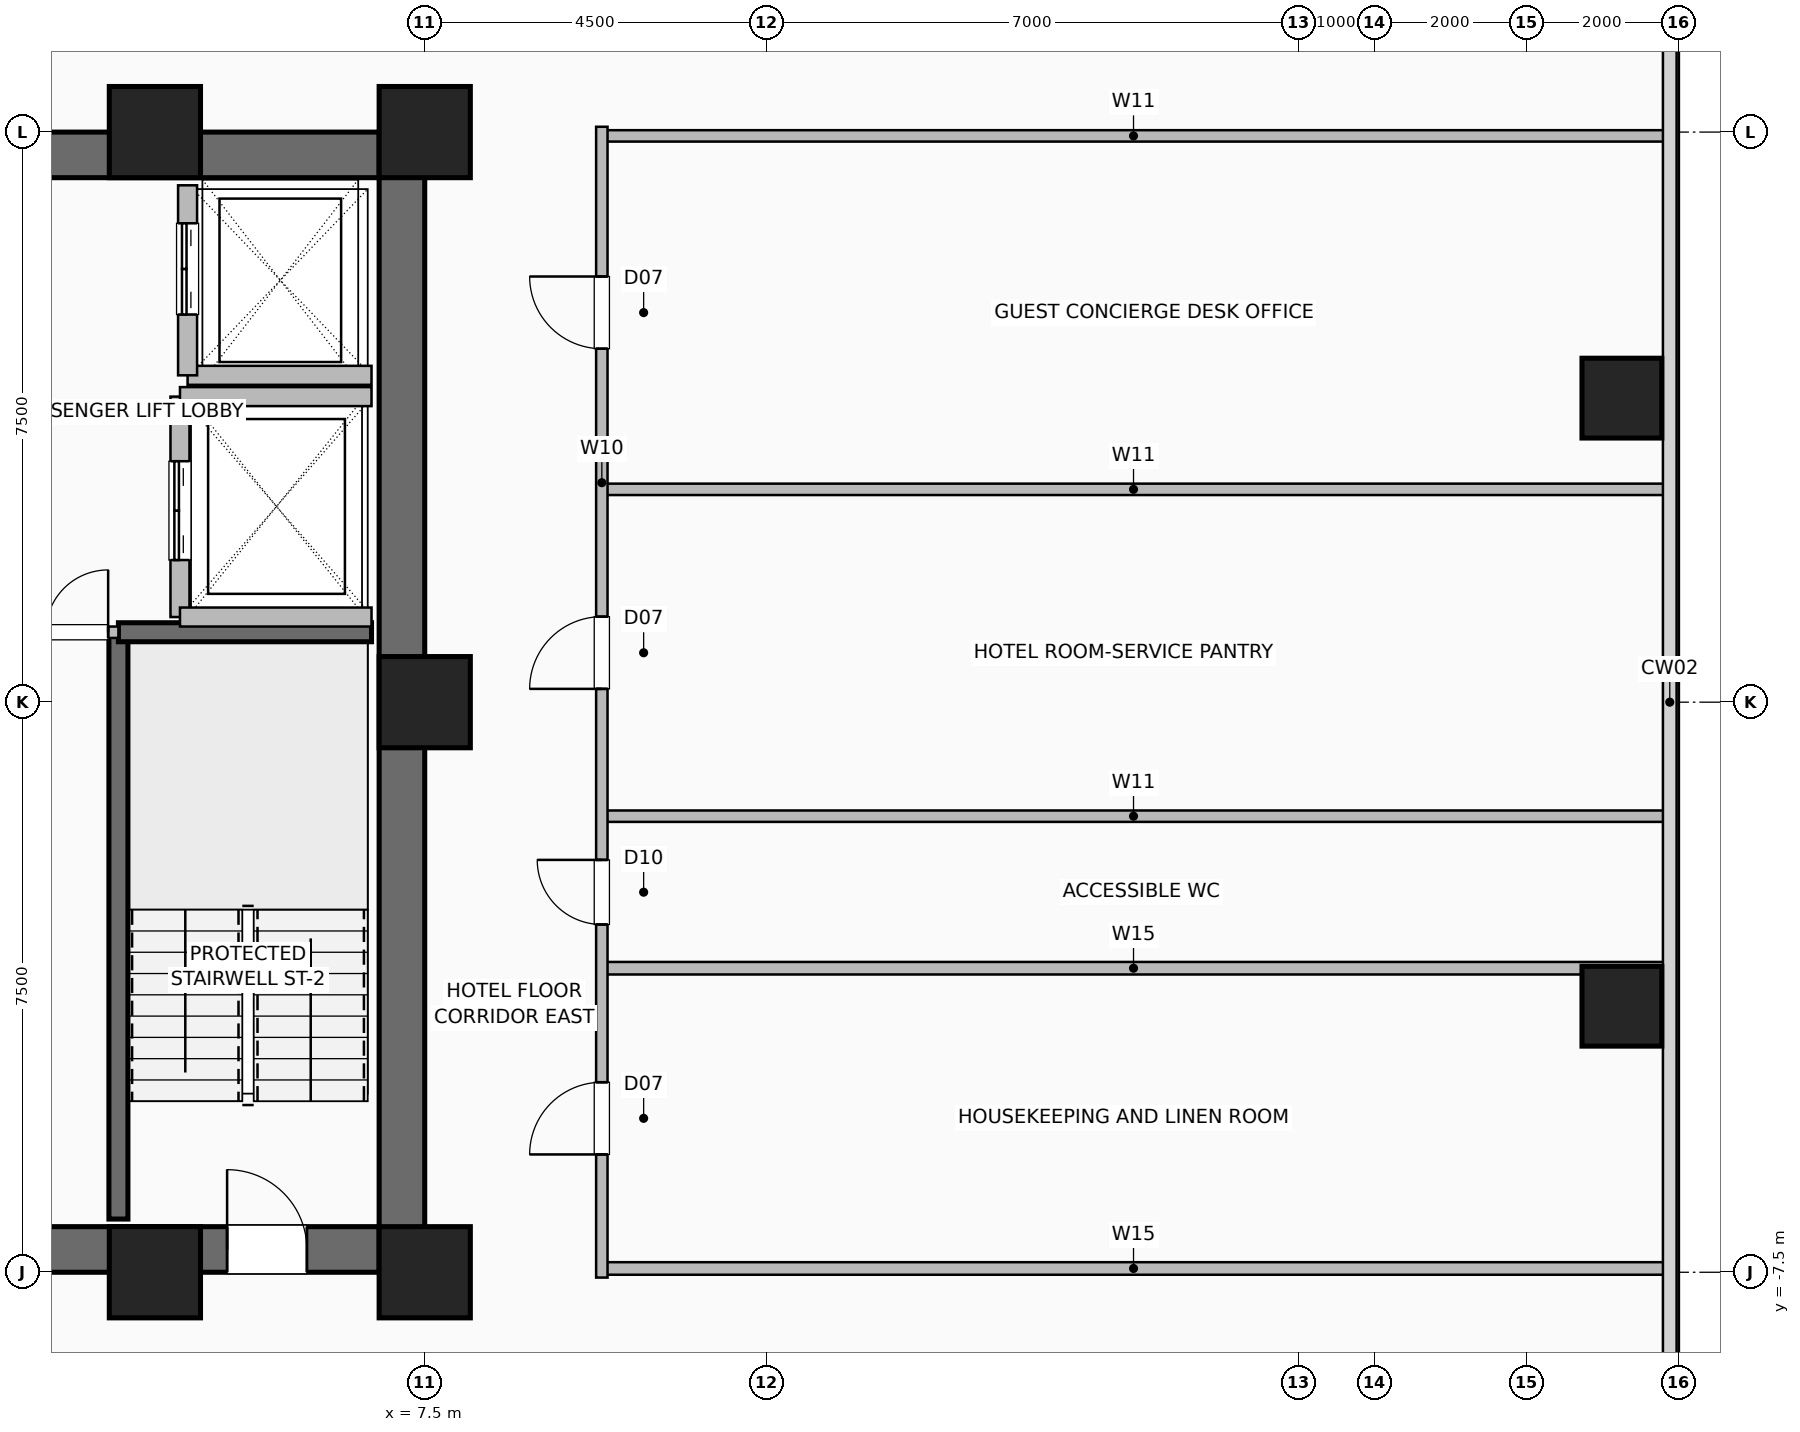
"""IFC4 building model, lengths in metres.
Left out: names, types, materials, properties, quantities, classifications, styles, units other than length and angle.
Written with IfcOpenShell. Run it as: python <this file> out.ifc"""

import sys

from ifc_helpers import new_model, si_unit, direction, frame, frame_2d, origin, origin_2d, place, context, subcontext, project, spatial, rectangle, hollow_rectangle, extrude, element, fill, save


model = new_model("IFC4")
c1 = context("Model", 3, precision=1e-05, world=origin(), true_north=direction((0.0, 1.0)))
c2 = subcontext(c1, "Body", "Model", "MODEL_VIEW")
j1 = project(units=[si_unit("LENGTHUNIT", "METRE"), si_unit("PLANEANGLEUNIT", "RADIAN")], contexts=[c1])
p1 = place(None, origin())
s1 = spatial("IfcSite", under=j1, at=p1, CompositionType="ELEMENT")
p2 = place(p1, origin())
s2 = spatial("IfcBuilding", under=s1, at=p2, CompositionType="ELEMENT")
p3 = place(p2, frame((0.0, 0.0, 30.5)))
s3 = spatial("IfcBuildingStorey", under=s2, at=p3, CompositionType="ELEMENT", Elevation=30.5)
for number, where, z_axis, x_axis in (
    (1, (3.95, -7.5, 0.0), (0.0, 0.0, 1.0), (1.0, 0.0, 0.0)),
    (2, (7.5, -7.5, 0.0), (0.0, 0.0, 1.0), (1.0, 0.0, 0.0)),
    (3, (7.5, 0.0, 0.0), (0.0, 0.0, 1.0), (1.0, 0.0, 0.0)),
    (4, (7.5, 7.5, 0.0), (0.0, 0.0, 1.0), (1.0, 0.0, 0.0)),
    (5, (3.95, 7.5, 0.0), (0.0, 0.0, 1.0), (1.0, 0.0, 0.0)),
):
    element("IfcColumn", number, at=place(p3, frame(where, z_axis=z_axis, x_axis=x_axis)), inside=s3, PredefinedType="COLUMN", context=c2, shape_type="SweptSolid", body=[
        extrude(hollow_rectangle(XDim=1.2, YDim=1.2, WallThickness=0.055, at=origin_2d()), origin(), (0.0, 0.0, 1.0), 3.5),
    ])
for number, where, z_axis, x_axis in (
    (6, (23.25, -4.0, 0.0), (0.0, 0.0, 1.0), (1.0, 0.0, 0.0)),
    (7, (23.25, 4.0, 0.0), (0.0, 0.0, 1.0), (1.0, 0.0, 0.0)),
):
    element("IfcColumn", number, at=place(p3, frame(where, z_axis=z_axis, x_axis=x_axis)), inside=s3, PredefinedType="COLUMN", context=c2, shape_type="SweptSolid", body=[
        extrude(hollow_rectangle(XDim=1.05, YDim=1.05, WallThickness=0.05, at=origin_2d()), origin(), (0.0, 0.0, 1.0), 3.5),
    ])
p4 = place(p3, frame((-7.5, -7.2, 0.0), z_axis=(0.0, 0.0, 1.0), x_axis=(1.0, 0.0, 0.0)))
e8 = element("IfcWall", 8, at=p4, inside=s3, PredefinedType="SHEAR", context=c2, shape_type="SweptSolid", body=[
    extrude(rectangle(XDim=15.0, YDim=0.6, at=frame_2d((7.5, 0.0))), origin(), (0.0, 0.0, 1.0), 3.25),
])
p5 = place(p4, frame((1.55, 0.0, 0.0)))
e9 = element("IfcOpeningElement", 9, at=p5, cuts=e8, PredefinedType="OPENING", context=c2, shape_type="SweptSolid", body=[
    extrude(rectangle(XDim=1.05, YDim=2.08, at=frame_2d((0.525, 1.04))), frame((0.0, 0.31, 0.0), z_axis=(0.0, -1.0, 0.0), x_axis=(1.0, 0.0, 0.0)), (0.0, 0.0, 1.0), 0.62),
])
p6 = place(p4, frame((12.4, 0.0, 0.0)))
e10 = element("IfcOpeningElement", 10, at=p6, cuts=e8, PredefinedType="OPENING", context=c2, shape_type="SweptSolid", body=[
    extrude(rectangle(XDim=1.05, YDim=2.08, at=frame_2d((0.525, 1.04))), frame((0.0, 0.31, 0.0), z_axis=(0.0, -1.0, 0.0), x_axis=(1.0, 0.0, 0.0)), (0.0, 0.0, 1.0), 0.62),
])
p7 = place(p4, frame((4.64, 0.0, 0.0)))
e11 = element("IfcOpeningElement", 11, at=p7, cuts=e8, PredefinedType="OPENING", context=c2, shape_type="SweptSolid", body=[
    extrude(rectangle(XDim=1.1, YDim=2.2, at=frame_2d((0.55, 1.1))), frame((0.0, 0.31, 0.0), z_axis=(0.0, -1.0, 0.0), x_axis=(1.0, 0.0, 0.0)), (0.0, 0.0, 1.0), 0.62),
])
p8 = place(p4, frame((6.52, 0.0, 0.0)))
e12 = element("IfcOpeningElement", 12, at=p8, cuts=e8, PredefinedType="OPENING", context=c2, shape_type="SweptSolid", body=[
    extrude(rectangle(XDim=1.1, YDim=2.2, at=frame_2d((0.55, 1.1))), frame((0.0, 0.31, 0.0), z_axis=(0.0, -1.0, 0.0), x_axis=(1.0, 0.0, 0.0)), (0.0, 0.0, 1.0), 0.62),
])
p9 = place(p4, frame((8.4, 0.0, 0.0)))
e13 = element("IfcOpeningElement", 13, at=p9, cuts=e8, PredefinedType="OPENING", context=c2, shape_type="SweptSolid", body=[
    extrude(rectangle(XDim=1.1, YDim=2.2, at=frame_2d((0.55, 1.1))), frame((0.0, 0.31, 0.0), z_axis=(0.0, -1.0, 0.0), x_axis=(1.0, 0.0, 0.0)), (0.0, 0.0, 1.0), 0.62),
])
for number, where, z_axis, x_axis in (
    (14, (-7.5, 7.2, 0.0), (0.0, 0.0, 1.0), (1.0, 0.0, 0.0)),
    (15, (7.2, -7.5, 0.0), (0.0, 0.0, 1.0), (0.0, 1.0, 0.0)),
):
    element("IfcWall", number, at=place(p3, frame(where, z_axis=z_axis, x_axis=x_axis)), inside=s3, PredefinedType="SHEAR", context=c2, shape_type="SweptSolid", body=[
        extrude(rectangle(XDim=15.0, YDim=0.6, at=frame_2d((7.5, 0.0))), origin(), (0.0, 0.0, 1.0), 3.25),
    ])
p10 = place(p3, frame((3.47, -6.8, 0.0), z_axis=(0.0, 0.0, 1.0), x_axis=(0.0, 1.0, 0.0)))
e16 = element("IfcWall", 16, at=p10, inside=s3, PredefinedType="SHEAR", context=c2, shape_type="SweptSolid", body=[
    extrude(rectangle(XDim=7.72, YDim=0.25, at=frame_2d((3.86, 0.0))), origin(), (0.0, 0.0, 1.0), 3.25),
])
p11 = place(p3, frame((3.47, 0.92, 0.0), z_axis=(0.0, 0.0, 1.0), x_axis=(1.0, 0.0, 0.0)))
e17 = element("IfcWall", 17, at=p11, inside=s3, PredefinedType="SHEAR", context=c2, shape_type="SweptSolid", body=[
    extrude(rectangle(XDim=3.33, YDim=0.25, at=frame_2d((1.665, 0.0))), origin(), (0.0, 0.0, 1.0), 3.25),
])
p12 = place(p3, frame((4.38, 4.3, 0.0), z_axis=(0.0, 0.0, 1.0), x_axis=(1.0, 0.0, 0.0)))
e18 = element("IfcWall", 18, at=p12, inside=s3, PredefinedType="SHEAR", context=c2, shape_type="SweptSolid", body=[
    extrude(rectangle(XDim=2.42, YDim=0.25, at=frame_2d((1.21, 0.0))), origin(), (0.0, 0.0, 1.0), 3.25),
])
p13 = place(p3, frame((4.38, 4.3, 0.0), z_axis=(0.0, 0.0, 1.0), x_axis=(0.0, 1.0, 0.0)))
e19 = element("IfcWall", 19, at=p13, inside=s3, PredefinedType="SHEAR", context=c2, shape_type="SweptSolid", body=[
    extrude(rectangle(XDim=2.5, YDim=0.25, at=frame_2d((1.25, 0.0))), origin(), (0.0, 0.0, 1.0), 3.25),
])
p14 = place(p13, frame((0.8, 0.0, 0.0)))
e20 = element("IfcOpeningElement", 20, at=p14, cuts=e19, PredefinedType="OPENING", context=c2, shape_type="SweptSolid", body=[
    extrude(rectangle(XDim=1.2, YDim=2.2, at=frame_2d((0.6, 1.1))), frame((0.0, 0.135, 0.0), z_axis=(0.0, -1.0, 0.0), x_axis=(1.0, 0.0, 0.0)), (0.0, 0.0, 1.0), 0.27),
])
p15 = place(p3, frame((4.28, 1.12, 0.0), z_axis=(0.0, 0.0, 1.0), x_axis=(0.0, 1.0, 0.0)))
e21 = element("IfcWall", 21, at=p15, inside=s3, PredefinedType="SHEAR", context=c2, shape_type="SweptSolid", body=[
    extrude(rectangle(XDim=2.9, YDim=0.25, at=frame_2d((1.45, 0.0))), origin(), (0.0, 0.0, 1.0), 3.25),
])
p16 = place(p15, frame((0.75, 0.0, 0.0)))
e22 = element("IfcOpeningElement", 22, at=p16, cuts=e21, PredefinedType="OPENING", context=c2, shape_type="SweptSolid", body=[
    extrude(rectangle(XDim=1.3, YDim=2.3, at=frame_2d((0.65, 1.15))), frame((0.0, 0.135, 0.0), z_axis=(0.0, -1.0, 0.0), x_axis=(1.0, 0.0, 0.0)), (0.0, 0.0, 1.0), 0.27),
])
for number, where, z_axis, x_axis in (
    (23, (4.28, 1.12, 0.0), (0.0, 0.0, 1.0), (1.0, 0.0, 0.0)),
    (24, (4.28, 4.02, 0.0), (0.0, 0.0, 1.0), (1.0, 0.0, 0.0)),
):
    element("IfcWall", number, at=place(p3, frame(where, z_axis=z_axis, x_axis=x_axis)), inside=s3, PredefinedType="SHEAR", context=c2, shape_type="SweptSolid", body=[
        extrude(rectangle(XDim=2.52, YDim=0.25, at=frame_2d((1.26, 0.0))), origin(), (0.0, 0.0, 1.0), 3.25),
    ])
p17 = place(p3, frame((2.38, 0.92, 0.0), z_axis=(0.0, 0.0, 1.0), x_axis=(1.0, 0.0, 0.0)))
e25 = element("IfcWall", 25, at=p17, inside=s3, PredefinedType="PARTITIONING", context=c2, shape_type="SweptSolid", body=[
    extrude(rectangle(XDim=1.09, YDim=0.15, at=frame_2d((0.545, 0.0))), origin(), (0.0, 0.0, 1.0), 3.25),
])
p18 = place(p17, frame((0.135, 0.0, 0.0)))
e26 = element("IfcOpeningElement", 26, at=p18, cuts=e25, PredefinedType="OPENING", context=c2, shape_type="SweptSolid", body=[
    extrude(rectangle(XDim=0.82, YDim=2.05, at=frame_2d((0.41, 1.025))), frame((0.0, 0.085, 0.0), z_axis=(0.0, -1.0, 0.0), x_axis=(1.0, 0.0, 0.0)), (0.0, 0.0, 1.0), 0.17),
])
for number, where, z_axis, x_axis in (
    (27, (9.83, -7.45, 0.0), (0.0, 0.0, 1.0), (1.0, 0.0, 0.0)),
    (28, (9.83, -3.5, 0.0), (0.0, 0.0, 1.0), (1.0, 0.0, 0.0)),
):
    element("IfcWall", number, at=place(p3, frame(where, z_axis=z_axis, x_axis=x_axis)), inside=s3, PredefinedType="PLUMBINGWALL", context=c2, shape_type="SweptSolid", body=[
        extrude(rectangle(XDim=13.99, YDim=0.165, at=frame_2d((6.995, 0.0))), origin(), (0.0, 0.0, 1.0), 3.25),
    ])
for number, where, z_axis, x_axis in (
    (29, (9.83, -1.5, 0.0), (0.0, 0.0, 1.0), (1.0, 0.0, 0.0)),
    (30, (9.83, 2.8, 0.0), (0.0, 0.0, 1.0), (1.0, 0.0, 0.0)),
    (31, (9.83, 7.45, 0.0), (0.0, 0.0, 1.0), (1.0, 0.0, 0.0)),
):
    element("IfcWall", number, at=place(p3, frame(where, z_axis=z_axis, x_axis=x_axis)), inside=s3, PredefinedType="PARTITIONING", context=c2, shape_type="SweptSolid", body=[
        extrude(rectangle(XDim=13.99, YDim=0.15, at=frame_2d((6.995, 0.0))), origin(), (0.0, 0.0, 1.0), 3.25),
    ])
p19 = place(p3, frame((9.83, -7.57, 0.0), z_axis=(0.0, 0.0, 1.0), x_axis=(0.0, 1.0, 0.0)))
e32 = element("IfcWall", 32, at=p19, inside=s3, PredefinedType="PARTITIONING", context=c2, shape_type="SweptSolid", body=[
    extrude(rectangle(XDim=15.14, YDim=0.15, at=frame_2d((7.57, 0.0))), origin(), (0.0, 0.0, 1.0), 3.25),
])
p20 = place(p19, frame((1.62, 0.0, 0.0)))
e33 = element("IfcOpeningElement", 33, at=p20, cuts=e32, PredefinedType="OPENING", context=c2, shape_type="SweptSolid", body=[
    extrude(rectangle(XDim=0.95, YDim=2.06, at=frame_2d((0.475, 1.03))), frame((0.0, 0.085, 0.0), z_axis=(0.0, -1.0, 0.0), x_axis=(1.0, 0.0, 0.0)), (0.0, 0.0, 1.0), 0.17),
])
p21 = place(p19, frame((4.645, 0.0, 0.0)))
e34 = element("IfcOpeningElement", 34, at=p21, cuts=e32, PredefinedType="OPENING", context=c2, shape_type="SweptSolid", body=[
    extrude(rectangle(XDim=0.85, YDim=2.05, at=frame_2d((0.425, 1.025))), frame((0.0, 0.085, 0.0), z_axis=(0.0, -1.0, 0.0), x_axis=(1.0, 0.0, 0.0)), (0.0, 0.0, 1.0), 0.17),
])
p22 = place(p19, frame((7.745, 0.0, 0.0)))
e35 = element("IfcOpeningElement", 35, at=p22, cuts=e32, PredefinedType="OPENING", context=c2, shape_type="SweptSolid", body=[
    extrude(rectangle(XDim=0.95, YDim=2.06, at=frame_2d((0.475, 1.03))), frame((0.0, 0.085, 0.0), z_axis=(0.0, -1.0, 0.0), x_axis=(1.0, 0.0, 0.0)), (0.0, 0.0, 1.0), 0.17),
])
p23 = place(p19, frame((12.22, 0.0, 0.0)))
e36 = element("IfcOpeningElement", 36, at=p23, cuts=e32, PredefinedType="OPENING", context=c2, shape_type="SweptSolid", body=[
    extrude(rectangle(XDim=0.95, YDim=2.06, at=frame_2d((0.475, 1.03))), frame((0.0, 0.085, 0.0), z_axis=(0.0, -1.0, 0.0), x_axis=(1.0, 0.0, 0.0)), (0.0, 0.0, 1.0), 0.17),
])
p24 = place(p6, origin())
e37 = element("IfcDoor", 37, at=p24, inside=s3, OperationType="SINGLE_SWING_LEFT", PredefinedType="DOOR", context=c2, shape_type="SweptSolid", body=[
    extrude(rectangle(XDim=1.05, YDim=2.08, at=frame_2d((0.525, 1.04))), frame((0.0, 0.025, 0.0), z_axis=(0.0, -1.0, 0.0), x_axis=(1.0, 0.0, 0.0)), (0.0, 0.0, 1.0), 0.05),
])
fill(e10, e37)
p25 = place(p14, origin())
e38 = element("IfcDoor", 38, at=p25, inside=s3, OperationType="DOUBLE_DOOR_SLIDING", PredefinedType="DOOR", context=c2, shape_type="SweptSolid", body=[
    extrude(rectangle(XDim=1.2, YDim=2.2, at=frame_2d((0.6, 1.1))), frame((0.0, 0.025, 0.0), z_axis=(0.0, -1.0, 0.0), x_axis=(1.0, 0.0, 0.0)), (0.0, 0.0, 1.0), 0.05),
])
fill(e20, e38)
p26 = place(p16, origin())
e39 = element("IfcDoor", 39, at=p26, inside=s3, OperationType="DOUBLE_DOOR_SLIDING", PredefinedType="DOOR", context=c2, shape_type="SweptSolid", body=[
    extrude(rectangle(XDim=1.3, YDim=2.3, at=frame_2d((0.65, 1.15))), frame((0.0, 0.025, 0.0), z_axis=(0.0, -1.0, 0.0), x_axis=(1.0, 0.0, 0.0)), (0.0, 0.0, 1.0), 0.05),
])
fill(e22, e39)
p27 = place(p18, origin())
e40 = element("IfcDoor", 40, at=p27, inside=s3, OperationType="SINGLE_SWING_RIGHT", PredefinedType="DOOR", context=c2, shape_type="SweptSolid", body=[
    extrude(rectangle(XDim=0.82, YDim=2.05, at=frame_2d((0.41, 1.025))), frame((0.0, 0.025, 0.0), z_axis=(0.0, -1.0, 0.0), x_axis=(1.0, 0.0, 0.0)), (0.0, 0.0, 1.0), 0.05),
])
fill(e26, e40)
p28 = place(p20, origin())
e41 = element("IfcDoor", 41, at=p28, inside=s3, OperationType="SINGLE_SWING_LEFT", PredefinedType="DOOR", context=c2, shape_type="SweptSolid", body=[
    extrude(rectangle(XDim=0.95, YDim=2.06, at=frame_2d((0.475, 1.03))), frame((0.0, 0.025, 0.0), z_axis=(0.0, -1.0, 0.0), x_axis=(1.0, 0.0, 0.0)), (0.0, 0.0, 1.0), 0.05),
])
fill(e33, e41)
p29 = place(p21, origin())
e42 = element("IfcDoor", 42, at=p29, inside=s3, OperationType="SINGLE_SWING_RIGHT", PredefinedType="DOOR", context=c2, shape_type="SweptSolid", body=[
    extrude(rectangle(XDim=0.85, YDim=2.05, at=frame_2d((0.425, 1.025))), frame((0.0, 0.025, 0.0), z_axis=(0.0, -1.0, 0.0), x_axis=(1.0, 0.0, 0.0)), (0.0, 0.0, 1.0), 0.05),
])
fill(e34, e42)
p30 = place(p22, origin())
e43 = element("IfcDoor", 43, at=p30, inside=s3, OperationType="SINGLE_SWING_LEFT", PredefinedType="DOOR", context=c2, shape_type="SweptSolid", body=[
    extrude(rectangle(XDim=0.95, YDim=2.06, at=frame_2d((0.475, 1.03))), frame((0.0, 0.025, 0.0), z_axis=(0.0, -1.0, 0.0), x_axis=(1.0, 0.0, 0.0)), (0.0, 0.0, 1.0), 0.05),
])
fill(e35, e43)
p31 = place(p23, origin())
e44 = element("IfcDoor", 44, at=p31, inside=s3, OperationType="SINGLE_SWING_RIGHT", PredefinedType="DOOR", context=c2, shape_type="SweptSolid", body=[
    extrude(rectangle(XDim=0.95, YDim=2.06, at=frame_2d((0.475, 1.03))), frame((0.0, 0.025, 0.0), z_axis=(0.0, -1.0, 0.0), x_axis=(1.0, 0.0, 0.0)), (0.0, 0.0, 1.0), 0.05),
])
fill(e36, e44)
save(model, sys.argv[1])
